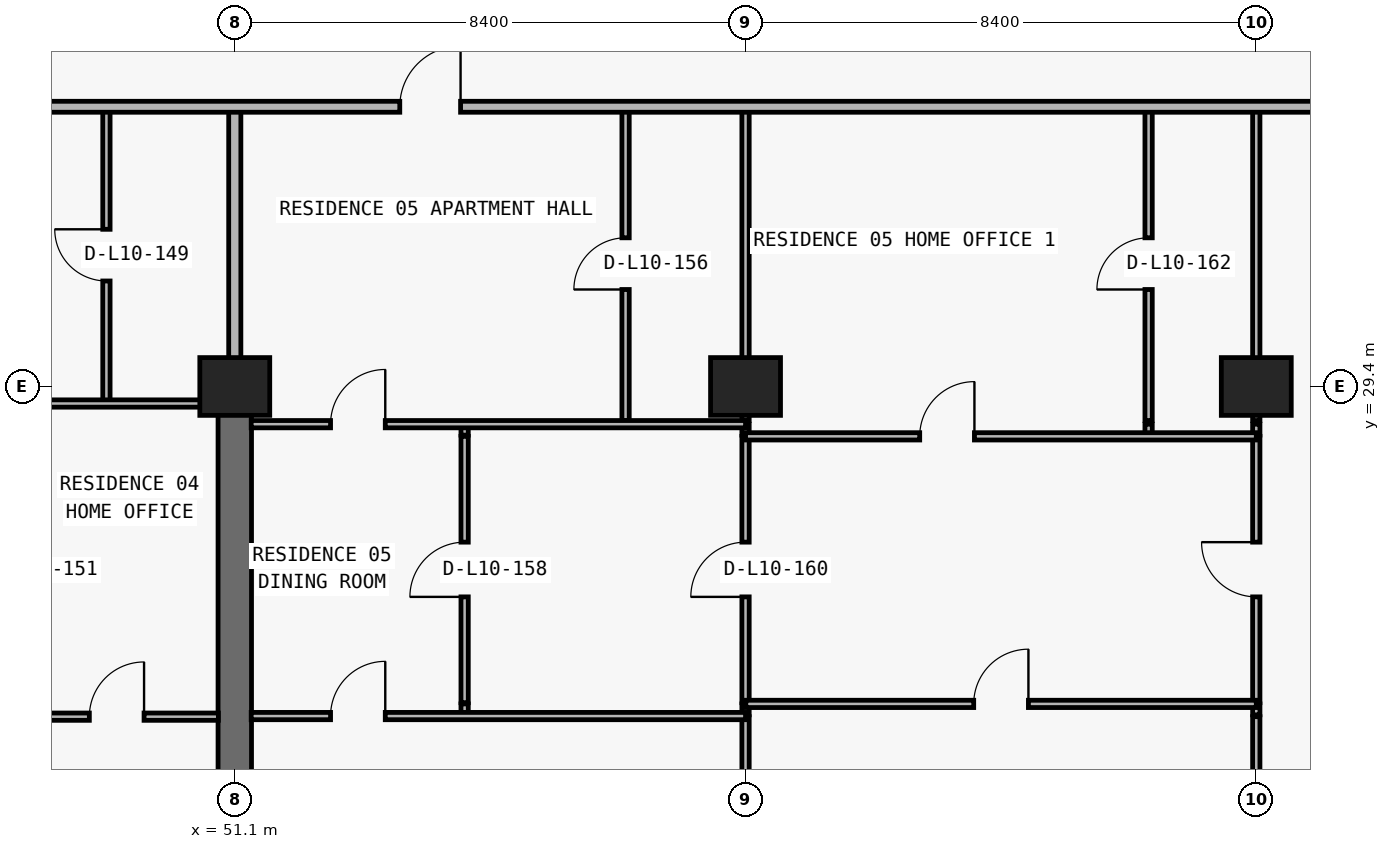
"""IFC4 building model, lengths in metres.
Left out: names, types, materials, properties, quantities, classifications, styles, units other than length and angle.
Written with IfcOpenShell. Run it as: python <this file> out.ifc"""

import sys

from ifc_helpers import new_model, si_unit, direction, frame, frame_2d, origin, origin_2d, place, context, subcontext, project, spatial, rectangle, extrude, element, fill, save


model = new_model("IFC4")
c1 = context("Model", 3, precision=1e-05, world=origin(), true_north=direction((0.0, 1.0)))
c2 = subcontext(c1, "Body", "Model", "MODEL_VIEW")
j1 = project(units=[si_unit("LENGTHUNIT", "METRE"), si_unit("PLANEANGLEUNIT", "RADIAN")], contexts=[c1])
p1 = place(None, origin())
s1 = spatial("IfcSite", under=j1, at=p1, CompositionType="ELEMENT")
p2 = place(p1, origin())
s2 = spatial("IfcBuilding", under=s1, at=p2, CompositionType="ELEMENT")
p3 = place(p2, frame((0.0, 0.0, 43.2)))
s3 = spatial("IfcBuildingStorey", under=s2, at=p3, CompositionType="ELEMENT", Elevation=43.2)
for number, where, z_axis, x_axis in (
    (1, (51.1, 29.4, 0.0), (0.0, 0.0, 1.0), (1.0, 0.0, 0.0)),
    (2, (59.5, 29.4, 0.0), (0.0, 0.0, 1.0), (1.0, 0.0, 0.0)),
    (3, (67.9, 29.4, 0.0), (0.0, 0.0, 1.0), (1.0, 0.0, 0.0)),
):
    element("IfcColumn", number, at=place(p3, frame(where, z_axis=z_axis, x_axis=x_axis)), inside=s3, PredefinedType="COLUMN", context=c2, shape_type="SweptSolid", body=[
        extrude(rectangle(XDim=1.15, YDim=0.95, at=origin_2d()), origin(), (0.0, 0.0, 1.0), 3.05),
    ])
p4 = place(p3, frame((51.1, 20.8, 0.0), z_axis=(0.0, 0.0, 1.0), x_axis=(0.0, 1.0, 0.0)))
e4 = element("IfcWall", 4, at=p4, inside=s3, PredefinedType="SHEAR", context=c2, shape_type="SweptSolid", body=[
    extrude(rectangle(XDim=8.6, YDim=0.55, at=frame_2d((4.3, 0.0))), origin(), (0.0, 0.0, 1.0), 3.05),
])
p5 = place(p3, frame((48.989, 29.12, 0.0), z_axis=(0.0, 0.0, 1.0), x_axis=(0.0, 1.0, 0.0)))
e5 = element("IfcWall", 5, at=p5, inside=s3, PredefinedType="PARTITIONING", context=c2, shape_type="SweptSolid", body=[
    extrude(rectangle(XDim=4.88, YDim=0.12, at=frame_2d((2.44, 0.0))), origin(), (0.0, 0.0, 1.0), 3.05),
])
p6 = place(p5, frame((2.015, 0.0, 0.0)))
e6 = element("IfcOpeningElement", 6, at=p6, cuts=e5, PredefinedType="OPENING", context=c2, shape_type="SweptSolid", body=[
    extrude(rectangle(XDim=0.85, YDim=2.1, at=frame_2d((0.425, 1.05))), frame((0.0, 0.07, 0.0), z_axis=(0.0, -1.0, 0.0), x_axis=(1.0, 0.0, 0.0)), (0.0, 0.0, 1.0), 0.14),
])
p7 = place(p3, frame((51.1, 29.405, 0.0), z_axis=(0.0, 0.0, 1.0), x_axis=(0.0, 1.0, 0.0)))
e7 = element("IfcWall", 7, at=p7, inside=s3, PredefinedType="PARTITIONING", context=c2, shape_type="SweptSolid", body=[
    extrude(rectangle(XDim=4.595, YDim=0.2, at=frame_2d((2.297, 0.0))), origin(), (0.0, 0.0, 1.0), 2.335),
])
p8 = place(p3, frame((54.88, 24.0, 0.0), z_axis=(0.0, 0.0, 1.0), x_axis=(0.0, 1.0, 0.0)))
e8 = element("IfcWall", 8, at=p8, inside=s3, PredefinedType="PARTITIONING", context=c2, shape_type="SweptSolid", body=[
    extrude(rectangle(XDim=0.18, YDim=0.12, at=frame_2d((0.09, 0.0))), origin(), (0.0, 0.0, 1.0), 3.05),
])
p9 = place(p3, frame((54.88, 24.2, 0.0), z_axis=(0.0, 0.0, 1.0), x_axis=(0.0, 1.0, 0.0)))
e9 = element("IfcWall", 9, at=p9, inside=s3, PredefinedType="PARTITIONING", context=c2, shape_type="SweptSolid", body=[
    extrude(rectangle(XDim=4.38, YDim=0.12, at=frame_2d((2.19, 0.0))), origin(), (0.0, 0.0, 1.0), 3.05),
])
p10 = place(p9, frame((1.74, 0.0, 0.0)))
e10 = element("IfcOpeningElement", 10, at=p10, cuts=e9, PredefinedType="OPENING", context=c2, shape_type="SweptSolid", body=[
    extrude(rectangle(XDim=0.9, YDim=2.15, at=frame_2d((0.45, 1.075))), frame((0.0, 0.07, 0.0), z_axis=(0.0, -1.0, 0.0), x_axis=(1.0, 0.0, 0.0)), (0.0, 0.0, 1.0), 0.14),
])
p11 = place(p3, frame((54.88, 28.6, 0.0), z_axis=(0.0, 0.0, 1.0), x_axis=(0.0, 1.0, 0.0)))
e11 = element("IfcWall", 11, at=p11, inside=s3, PredefinedType="PARTITIONING", context=c2, shape_type="SweptSolid", body=[
    extrude(rectangle(XDim=0.18, YDim=0.12, at=frame_2d((0.09, 0.0))), origin(), (0.0, 0.0, 1.0), 3.05),
])
p12 = place(p3, frame((57.527, 28.84, 0.0), z_axis=(0.0, 0.0, 1.0), x_axis=(0.0, 1.0, 0.0)))
e12 = element("IfcWall", 12, at=p12, inside=s3, PredefinedType="PARTITIONING", context=c2, shape_type="SweptSolid", body=[
    extrude(rectangle(XDim=5.16, YDim=0.12, at=frame_2d((2.58, 0.0))), origin(), (0.0, 0.0, 1.0), 3.05),
])
p13 = place(p12, frame((2.155, 0.0, 0.0)))
e13 = element("IfcOpeningElement", 13, at=p13, cuts=e12, PredefinedType="OPENING", context=c2, shape_type="SweptSolid", body=[
    extrude(rectangle(XDim=0.85, YDim=2.1, at=frame_2d((0.425, 1.05))), frame((0.0, 0.07, 0.0), z_axis=(0.0, -1.0, 0.0), x_axis=(1.0, 0.0, 0.0)), (0.0, 0.0, 1.0), 0.14),
])
p14 = place(p3, frame((59.5, 6.24, 0.0), z_axis=(0.0, 0.0, 1.0), x_axis=(0.0, 1.0, 0.0)))
e14 = element("IfcWall", 14, at=p14, inside=s3, PredefinedType="PARTITIONING", context=c2, shape_type="SweptSolid", body=[
    extrude(rectangle(XDim=17.73, YDim=0.12, at=frame_2d((8.865, 0.0))), origin(), (0.0, 0.0, 1.0), 2.11),
])
p15 = place(p3, frame((59.5, 24.0, 0.0), z_axis=(0.0, 0.0, 1.0), x_axis=(0.0, 1.0, 0.0)))
e15 = element("IfcWall", 15, at=p15, inside=s3, PredefinedType="PARTITIONING", context=c2, shape_type="SweptSolid", body=[
    extrude(rectangle(XDim=0.18, YDim=0.12, at=frame_2d((0.09, 0.0))), origin(), (0.0, 0.0, 1.0), 2.11),
])
p16 = place(p3, frame((59.5, 24.2, 0.0), z_axis=(0.0, 0.0, 1.0), x_axis=(0.0, 1.0, 0.0)))
e16 = element("IfcWall", 16, at=p16, inside=s3, PredefinedType="PARTITIONING", context=c2, shape_type="SweptSolid", body=[
    extrude(rectangle(XDim=4.38, YDim=0.12, at=frame_2d((2.19, 0.0))), origin(), (0.0, 0.0, 1.0), 2.11),
])
p17 = place(p16, frame((1.74, 0.0, 0.0)))
e17 = element("IfcOpeningElement", 17, at=p17, cuts=e16, PredefinedType="OPENING", context=c2, shape_type="SweptSolid", body=[
    extrude(rectangle(XDim=0.9, YDim=2.06, at=frame_2d((0.45, 1.03))), frame((0.0, 0.07, 0.0), z_axis=(0.0, -1.0, 0.0), x_axis=(1.0, 0.0, 0.0)), (0.0, 0.0, 1.0), 0.14),
])
p18 = place(p3, frame((59.5, 28.6, 0.0), z_axis=(0.0, 0.0, 1.0), x_axis=(0.0, 1.0, 0.0)))
e18 = element("IfcWall", 18, at=p18, inside=s3, PredefinedType="PARTITIONING", context=c2, shape_type="SweptSolid", body=[
    extrude(rectangle(XDim=0.18, YDim=0.12, at=frame_2d((0.09, 0.0))), origin(), (0.0, 0.0, 1.0), 2.11),
])
p19 = place(p3, frame((59.5, 28.84, 0.0), z_axis=(0.0, 0.0, 1.0), x_axis=(0.0, 1.0, 0.0)))
e19 = element("IfcWall", 19, at=p19, inside=s3, PredefinedType="PARTITIONING", context=c2, shape_type="SweptSolid", body=[
    extrude(rectangle(XDim=5.16, YDim=0.12, at=frame_2d((2.58, 0.0))), origin(), (0.0, 0.0, 1.0), 2.11),
])
p20 = place(p3, frame((66.129, 28.6, 0.0), z_axis=(0.0, 0.0, 1.0), x_axis=(0.0, 1.0, 0.0)))
e20 = element("IfcWall", 20, at=p20, inside=s3, PredefinedType="PARTITIONING", context=c2, shape_type="SweptSolid", body=[
    extrude(rectangle(XDim=0.18, YDim=0.12, at=frame_2d((0.09, 0.0))), origin(), (0.0, 0.0, 1.0), 3.05),
])
p21 = place(p3, frame((66.129, 28.84, 0.0), z_axis=(0.0, 0.0, 1.0), x_axis=(0.0, 1.0, 0.0)))
e21 = element("IfcWall", 21, at=p21, inside=s3, PredefinedType="PARTITIONING", context=c2, shape_type="SweptSolid", body=[
    extrude(rectangle(XDim=5.16, YDim=0.12, at=frame_2d((2.58, 0.0))), origin(), (0.0, 0.0, 1.0), 3.05),
])
p22 = place(p21, frame((2.155, 0.0, 0.0)))
e22 = element("IfcOpeningElement", 22, at=p22, cuts=e21, PredefinedType="OPENING", context=c2, shape_type="SweptSolid", body=[
    extrude(rectangle(XDim=0.85, YDim=2.1, at=frame_2d((0.425, 1.05))), frame((0.0, 0.07, 0.0), z_axis=(0.0, -1.0, 0.0), x_axis=(1.0, 0.0, 0.0)), (0.0, 0.0, 1.0), 0.14),
])
p23 = place(p3, frame((67.9, 6.24, 0.0), z_axis=(0.0, 0.0, 1.0), x_axis=(0.0, 1.0, 0.0)))
e23 = element("IfcWall", 23, at=p23, inside=s3, PredefinedType="PARTITIONING", context=c2, shape_type="SweptSolid", body=[
    extrude(rectangle(XDim=17.73, YDim=0.12, at=frame_2d((8.865, 0.0))), origin(), (0.0, 0.0, 1.0), 2.11),
])
p24 = place(p3, frame((67.9, 24.0, 0.0), z_axis=(0.0, 0.0, 1.0), x_axis=(0.0, 1.0, 0.0)))
e24 = element("IfcWall", 24, at=p24, inside=s3, PredefinedType="PARTITIONING", context=c2, shape_type="SweptSolid", body=[
    extrude(rectangle(XDim=0.18, YDim=0.12, at=frame_2d((0.09, 0.0))), origin(), (0.0, 0.0, 1.0), 2.11),
])
p25 = place(p3, frame((67.9, 24.2, 0.0), z_axis=(0.0, 0.0, 1.0), x_axis=(0.0, 1.0, 0.0)))
e25 = element("IfcWall", 25, at=p25, inside=s3, PredefinedType="PARTITIONING", context=c2, shape_type="SweptSolid", body=[
    extrude(rectangle(XDim=4.38, YDim=0.12, at=frame_2d((2.19, 0.0))), origin(), (0.0, 0.0, 1.0), 2.11),
])
p26 = place(p25, frame((1.74, 0.0, 0.0)))
e26 = element("IfcOpeningElement", 26, at=p26, cuts=e25, PredefinedType="OPENING", context=c2, shape_type="SweptSolid", body=[
    extrude(rectangle(XDim=0.9, YDim=2.06, at=frame_2d((0.45, 1.03))), frame((0.0, 0.07, 0.0), z_axis=(0.0, -1.0, 0.0), x_axis=(1.0, 0.0, 0.0)), (0.0, 0.0, 1.0), 0.14),
])
p27 = place(p3, frame((67.9, 28.6, 0.0), z_axis=(0.0, 0.0, 1.0), x_axis=(0.0, 1.0, 0.0)))
e27 = element("IfcWall", 27, at=p27, inside=s3, PredefinedType="PARTITIONING", context=c2, shape_type="SweptSolid", body=[
    extrude(rectangle(XDim=0.18, YDim=0.12, at=frame_2d((0.09, 0.0))), origin(), (0.0, 0.0, 1.0), 2.11),
])
p28 = place(p3, frame((67.9, 28.84, 0.0), z_axis=(0.0, 0.0, 1.0), x_axis=(0.0, 1.0, 0.0)))
e28 = element("IfcWall", 28, at=p28, inside=s3, PredefinedType="PARTITIONING", context=c2, shape_type="SweptSolid", body=[
    extrude(rectangle(XDim=5.16, YDim=0.12, at=frame_2d((2.58, 0.0))), origin(), (0.0, 0.0, 1.0), 2.11),
])
p29 = place(p3, frame((42.7, 23.97, 0.0), z_axis=(0.0, 0.0, 1.0), x_axis=(1.0, 0.0, 0.0)))
e29 = element("IfcWall", 29, at=p29, inside=s3, PredefinedType="PARTITIONING", context=c2, shape_type="SweptSolid", body=[
    extrude(rectangle(XDim=8.13, YDim=0.12, at=frame_2d((4.065, 0.0))), origin(), (0.0, 0.0, 1.0), 3.05),
])
p30 = place(p29, frame((1.86, 0.0, 0.0)))
e30 = element("IfcOpeningElement", 30, at=p30, cuts=e29, PredefinedType="OPENING", context=c2, shape_type="SweptSolid", body=[
    extrude(rectangle(XDim=0.9, YDim=2.15, at=frame_2d((0.45, 1.075))), frame((0.0, 0.07, 0.0), z_axis=(0.0, -1.0, 0.0), x_axis=(1.0, 0.0, 0.0)), (0.0, 0.0, 1.0), 0.14),
])
p31 = place(p29, frame((6.008, 0.0, 0.0)))
e31 = element("IfcOpeningElement", 31, at=p31, cuts=e29, PredefinedType="OPENING", context=c2, shape_type="SweptSolid", body=[
    extrude(rectangle(XDim=0.9, YDim=2.15, at=frame_2d((0.45, 1.075))), frame((0.0, 0.07, 0.0), z_axis=(0.0, -1.0, 0.0), x_axis=(1.0, 0.0, 0.0)), (0.0, 0.0, 1.0), 0.14),
])
p32 = place(p3, frame((51.37, 23.98, 0.0), z_axis=(0.0, 0.0, 1.0), x_axis=(1.0, 0.0, 0.0)))
e32 = element("IfcWall", 32, at=p32, inside=s3, PredefinedType="PARTITIONING", context=c2, shape_type="SweptSolid", body=[
    extrude(rectangle(XDim=8.13, YDim=0.12, at=frame_2d((4.065, 0.0))), origin(), (0.0, 0.0, 1.0), 3.05),
])
p33 = place(p32, frame((1.305, 0.0, 0.0)))
e33 = element("IfcOpeningElement", 33, at=p33, cuts=e32, PredefinedType="OPENING", context=c2, shape_type="SweptSolid", body=[
    extrude(rectangle(XDim=0.9, YDim=2.15, at=frame_2d((0.45, 1.075))), frame((0.0, 0.07, 0.0), z_axis=(0.0, -1.0, 0.0), x_axis=(1.0, 0.0, 0.0)), (0.0, 0.0, 1.0), 0.14),
])
p34 = place(p3, frame((59.505, 24.18, 0.0), z_axis=(0.0, 0.0, 1.0), x_axis=(1.0, 0.0, 0.0)))
e34 = element("IfcWall", 34, at=p34, inside=s3, PredefinedType="PARTITIONING", context=c2, shape_type="SweptSolid", body=[
    extrude(rectangle(XDim=8.395, YDim=0.12, at=frame_2d((4.198, 0.0))), origin(), (0.0, 0.0, 1.0), 3.05),
])
p35 = place(p34, frame((3.748, 0.0, 0.0)))
e35 = element("IfcOpeningElement", 35, at=p35, cuts=e34, PredefinedType="OPENING", context=c2, shape_type="SweptSolid", body=[
    extrude(rectangle(XDim=0.9, YDim=2.15, at=frame_2d((0.45, 1.075))), frame((0.0, 0.07, 0.0), z_axis=(0.0, -1.0, 0.0), x_axis=(1.0, 0.0, 0.0)), (0.0, 0.0, 1.0), 0.14),
])
p36 = place(p3, frame((59.5, 28.58, 0.0), z_axis=(0.0, 0.0, 1.0), x_axis=(1.0, 0.0, 0.0)))
e36 = element("IfcWall", 36, at=p36, inside=s3, PredefinedType="PARTITIONING", context=c2, shape_type="SweptSolid", body=[
    extrude(rectangle(XDim=8.4, YDim=0.12, at=frame_2d((4.2, 0.0))), origin(), (0.0, 0.0, 1.0), 3.05),
])
p37 = place(p36, frame((2.865, 0.0, 0.0)))
e37 = element("IfcOpeningElement", 37, at=p37, cuts=e36, PredefinedType="OPENING", context=c2, shape_type="SweptSolid", body=[
    extrude(rectangle(XDim=0.9, YDim=2.15, at=frame_2d((0.45, 1.075))), frame((0.0, 0.07, 0.0), z_axis=(0.0, -1.0, 0.0), x_axis=(1.0, 0.0, 0.0)), (0.0, 0.0, 1.0), 0.14),
])
p38 = place(p3, frame((51.37, 28.78, 0.0), z_axis=(0.0, 0.0, 1.0), x_axis=(1.0, 0.0, 0.0)))
e38 = element("IfcWall", 38, at=p38, inside=s3, PredefinedType="PARTITIONING", context=c2, shape_type="SweptSolid", body=[
    extrude(rectangle(XDim=8.13, YDim=0.12, at=frame_2d((4.065, 0.0))), origin(), (0.0, 0.0, 1.0), 3.05),
])
p39 = place(p38, frame((1.305, 0.0, 0.0)))
e39 = element("IfcOpeningElement", 39, at=p39, cuts=e38, PredefinedType="OPENING", context=c2, shape_type="SweptSolid", body=[
    extrude(rectangle(XDim=0.9, YDim=2.15, at=frame_2d((0.45, 1.075))), frame((0.0, 0.07, 0.0), z_axis=(0.0, -1.0, 0.0), x_axis=(1.0, 0.0, 0.0)), (0.0, 0.0, 1.0), 0.14),
])
p40 = place(p3, frame((42.7, 29.12, 0.0), z_axis=(0.0, 0.0, 1.0), x_axis=(1.0, 0.0, 0.0)))
e40 = element("IfcWall", 40, at=p40, inside=s3, PredefinedType="PARTITIONING", context=c2, shape_type="SweptSolid", body=[
    extrude(rectangle(XDim=8.13, YDim=0.12, at=frame_2d((4.065, 0.0))), origin(), (0.0, 0.0, 1.0), 2.11),
])
p41 = place(p40, frame((1.943, 0.0, 0.0)))
e41 = element("IfcOpeningElement", 41, at=p41, cuts=e40, PredefinedType="OPENING", context=c2, shape_type="SweptSolid", body=[
    extrude(rectangle(XDim=0.9, YDim=2.06, at=frame_2d((0.45, 1.03))), frame((0.0, 0.07, 0.0), z_axis=(0.0, -1.0, 0.0), x_axis=(1.0, 0.0, 0.0)), (0.0, 0.0, 1.0), 0.14),
])
p42 = place(p3, frame((31.4, 34.0, 0.0), z_axis=(0.0, 0.0, 1.0), x_axis=(1.0, 0.0, 0.0)))
e42 = element("IfcWall", 42, at=p42, inside=s3, PredefinedType="PARTITIONING", context=c2, shape_type="SweptSolid", body=[
    extrude(rectangle(XDim=41.3, YDim=0.18, at=frame_2d((20.65, 0.0))), origin(), (0.0, 0.0, 1.0), 3.05),
])
p43 = place(p42, frame((6.07, 0.0, 0.0)))
e43 = element("IfcOpeningElement", 43, at=p43, cuts=e42, PredefinedType="OPENING", context=c2, shape_type="SweptSolid", body=[
    extrude(rectangle(XDim=1.0, YDim=2.2, at=frame_2d((0.5, 1.1))), frame((0.0, 0.1, 0.0), z_axis=(0.0, -1.0, 0.0), x_axis=(1.0, 0.0, 0.0)), (0.0, 0.0, 1.0), 0.2),
])
p44 = place(p42, frame((13.945, 0.0, 0.0)))
e44 = element("IfcOpeningElement", 44, at=p44, cuts=e42, PredefinedType="OPENING", context=c2, shape_type="SweptSolid", body=[
    extrude(rectangle(XDim=1.0, YDim=2.2, at=frame_2d((0.5, 1.1))), frame((0.0, 0.1, 0.0), z_axis=(0.0, -1.0, 0.0), x_axis=(1.0, 0.0, 0.0)), (0.0, 0.0, 1.0), 0.2),
])
p45 = place(p42, frame((22.414, 0.0, 0.0)))
e45 = element("IfcOpeningElement", 45, at=p45, cuts=e42, PredefinedType="OPENING", context=c2, shape_type="SweptSolid", body=[
    extrude(rectangle(XDim=1.0, YDim=2.2, at=frame_2d((0.5, 1.1))), frame((0.0, 0.1, 0.0), z_axis=(0.0, -1.0, 0.0), x_axis=(1.0, 0.0, 0.0)), (0.0, 0.0, 1.0), 0.2),
])
p46 = place(p6, origin())
e46 = element("IfcDoor", 46, at=p46, inside=s3, OperationType="SINGLE_SWING_RIGHT", PredefinedType="DOOR", context=c2, shape_type="SweptSolid", body=[
    extrude(rectangle(XDim=0.85, YDim=2.1, at=frame_2d((0.425, 1.05))), frame((0.0, 0.025, 0.0), z_axis=(0.0, -1.0, 0.0), x_axis=(1.0, 0.0, 0.0)), (0.0, 0.0, 1.0), 0.05),
])
fill(e6, e46)
p47 = place(p31, origin())
e47 = element("IfcDoor", 47, at=p47, inside=s3, OperationType="SINGLE_SWING_RIGHT", PredefinedType="DOOR", context=c2, shape_type="SweptSolid", body=[
    extrude(rectangle(XDim=0.9, YDim=2.15, at=frame_2d((0.45, 1.075))), frame((0.0, 0.025, 0.0), z_axis=(0.0, -1.0, 0.0), x_axis=(1.0, 0.0, 0.0)), (0.0, 0.0, 1.0), 0.05),
])
fill(e31, e47)
p48 = place(p45, origin())
e48 = element("IfcDoor", 48, at=p48, inside=s3, OperationType="SINGLE_SWING_RIGHT", PredefinedType="DOOR", context=c2, shape_type="SweptSolid", body=[
    extrude(rectangle(XDim=1.0, YDim=2.2, at=frame_2d((0.5, 1.1))), frame((0.0, 0.025, 0.0), z_axis=(0.0, -1.0, 0.0), x_axis=(1.0, 0.0, 0.0)), (0.0, 0.0, 1.0), 0.05),
])
fill(e45, e48)
p49 = place(p13, origin())
e49 = element("IfcDoor", 49, at=p49, inside=s3, OperationType="SINGLE_SWING_LEFT", PredefinedType="DOOR", context=c2, shape_type="SweptSolid", body=[
    extrude(rectangle(XDim=0.85, YDim=2.1, at=frame_2d((0.425, 1.05))), frame((0.0, 0.025, 0.0), z_axis=(0.0, -1.0, 0.0), x_axis=(1.0, 0.0, 0.0)), (0.0, 0.0, 1.0), 0.05),
])
fill(e13, e49)
p50 = place(p39, origin())
e50 = element("IfcDoor", 50, at=p50, inside=s3, OperationType="SINGLE_SWING_RIGHT", PredefinedType="DOOR", context=c2, shape_type="SweptSolid", body=[
    extrude(rectangle(XDim=0.9, YDim=2.15, at=frame_2d((0.45, 1.075))), frame((0.0, 0.025, 0.0), z_axis=(0.0, -1.0, 0.0), x_axis=(1.0, 0.0, 0.0)), (0.0, 0.0, 1.0), 0.05),
])
fill(e39, e50)
p51 = place(p10, origin())
e51 = element("IfcDoor", 51, at=p51, inside=s3, OperationType="SINGLE_SWING_LEFT", PredefinedType="DOOR", context=c2, shape_type="SweptSolid", body=[
    extrude(rectangle(XDim=0.9, YDim=2.15, at=frame_2d((0.45, 1.075))), frame((0.0, 0.025, 0.0), z_axis=(0.0, -1.0, 0.0), x_axis=(1.0, 0.0, 0.0)), (0.0, 0.0, 1.0), 0.05),
])
fill(e10, e51)
p52 = place(p33, origin())
e52 = element("IfcDoor", 52, at=p52, inside=s3, OperationType="SINGLE_SWING_RIGHT", PredefinedType="DOOR", context=c2, shape_type="SweptSolid", body=[
    extrude(rectangle(XDim=0.9, YDim=2.15, at=frame_2d((0.45, 1.075))), frame((0.0, 0.025, 0.0), z_axis=(0.0, -1.0, 0.0), x_axis=(1.0, 0.0, 0.0)), (0.0, 0.0, 1.0), 0.05),
])
fill(e33, e52)
p53 = place(p17, origin())
e53 = element("IfcDoor", 53, at=p53, inside=s3, OperationType="SINGLE_SWING_LEFT", PredefinedType="DOOR", context=c2, shape_type="SweptSolid", body=[
    extrude(rectangle(XDim=0.9, YDim=2.06, at=frame_2d((0.45, 1.03))), frame((0.0, 0.025, 0.0), z_axis=(0.0, -1.0, 0.0), x_axis=(1.0, 0.0, 0.0)), (0.0, 0.0, 1.0), 0.05),
])
fill(e17, e53)
p54 = place(p37, origin())
e54 = element("IfcDoor", 54, at=p54, inside=s3, OperationType="SINGLE_SWING_RIGHT", PredefinedType="DOOR", context=c2, shape_type="SweptSolid", body=[
    extrude(rectangle(XDim=0.9, YDim=2.15, at=frame_2d((0.45, 1.075))), frame((0.0, 0.025, 0.0), z_axis=(0.0, -1.0, 0.0), x_axis=(1.0, 0.0, 0.0)), (0.0, 0.0, 1.0), 0.05),
])
fill(e37, e54)
p55 = place(p22, origin())
e55 = element("IfcDoor", 55, at=p55, inside=s3, OperationType="SINGLE_SWING_LEFT", PredefinedType="DOOR", context=c2, shape_type="SweptSolid", body=[
    extrude(rectangle(XDim=0.85, YDim=2.1, at=frame_2d((0.425, 1.05))), frame((0.0, 0.025, 0.0), z_axis=(0.0, -1.0, 0.0), x_axis=(1.0, 0.0, 0.0)), (0.0, 0.0, 1.0), 0.05),
])
fill(e22, e55)
p56 = place(p35, origin())
e56 = element("IfcDoor", 56, at=p56, inside=s3, OperationType="SINGLE_SWING_RIGHT", PredefinedType="DOOR", context=c2, shape_type="SweptSolid", body=[
    extrude(rectangle(XDim=0.9, YDim=2.15, at=frame_2d((0.45, 1.075))), frame((0.0, 0.025, 0.0), z_axis=(0.0, -1.0, 0.0), x_axis=(1.0, 0.0, 0.0)), (0.0, 0.0, 1.0), 0.05),
])
fill(e35, e56)
p57 = place(p26, origin())
e57 = element("IfcDoor", 57, at=p57, inside=s3, OperationType="SINGLE_SWING_RIGHT", PredefinedType="DOOR", context=c2, shape_type="SweptSolid", body=[
    extrude(rectangle(XDim=0.9, YDim=2.06, at=frame_2d((0.45, 1.03))), frame((0.0, 0.025, 0.0), z_axis=(0.0, -1.0, 0.0), x_axis=(1.0, 0.0, 0.0)), (0.0, 0.0, 1.0), 0.05),
])
fill(e26, e57)
save(model, sys.argv[1])
